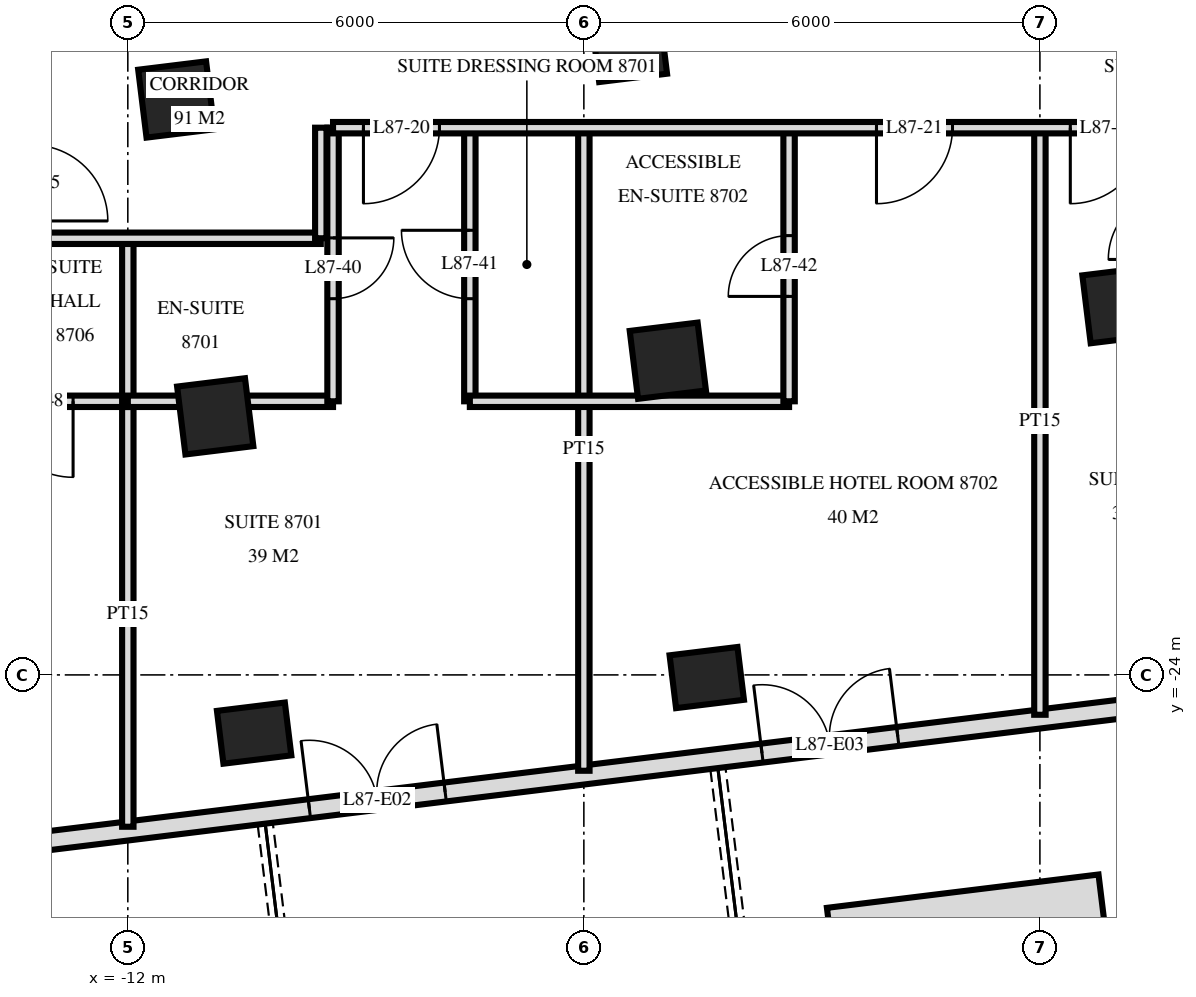
"""IFC4 building model, lengths in metres.
Left out: names, types, materials, properties, quantities, classifications, styles, units other than length and angle.
Written with IfcOpenShell. Run it as: python <this file> out.ifc"""

import sys

from ifc_helpers import new_model, si_unit, direction, frame, frame_2d, origin, origin_2d, place, context, subcontext, project, spatial, rectangle, extrude, element, fill, save


model = new_model("IFC4")
c1 = context("Model", 3, precision=1e-05, world=origin(), true_north=direction((0.0, 1.0)))
c2 = subcontext(c1, "Body", "Model", "MODEL_VIEW")
j1 = project(units=[si_unit("LENGTHUNIT", "METRE"), si_unit("PLANEANGLEUNIT", "RADIAN")], contexts=[c1])
p1 = place(None, origin())
s1 = spatial("IfcSite", under=j1, at=p1, CompositionType="ELEMENT")
p2 = place(p1, origin())
s2 = spatial("IfcBuilding", under=s1, at=p2, CompositionType="ELEMENT")
p3 = place(p2, frame((0.0, 0.0, 330.6)))
s3 = spatial("IfcBuildingStorey", under=s2, at=p3, CompositionType="ELEMENT", Elevation=330.6)
for number, where, z_axis, x_axis in (
    (1, (-11.362, -16.429, 0.0), (0.0, 0.0, 1.0), (0.993, 0.122, 0.0)),
    (2, (-10.85, -20.598, 0.0), (0.0, 0.0, 1.0), (0.993, 0.122, 0.0)),
):
    element("IfcColumn", number, at=place(p3, frame(where, z_axis=z_axis, x_axis=x_axis)), inside=s3, PredefinedType="COLUMN", context=c2, shape_type="SweptSolid", body=[
        extrude(rectangle(XDim=0.9, YDim=0.9, at=origin_2d()), origin(), (0.0, 0.0, 1.0), 4.0),
    ])
p4 = place(p3, frame((-10.338, -24.766, 0.0), z_axis=(0.0, 0.0, 1.0), x_axis=(0.992546151641, 0.121869343405, 0.0)))
e3 = element("IfcColumn", 3, at=p4, inside=s3, PredefinedType="COLUMN", context=c2, shape_type="SweptSolid", body=[
    extrude(rectangle(XDim=0.9, YDim=0.7, at=origin_2d()), origin(), (0.0, 0.0, 1.0), 4.0),
])
for number, where, z_axis, x_axis in (
    (4, (-5.407, -15.698, 0.0), (0.0, 0.0, 1.0), (0.993, 0.122, 0.0)),
    (5, (-4.895, -19.866, 0.0), (0.0, 0.0, 1.0), (0.993, 0.122, 0.0)),
):
    element("IfcColumn", number, at=place(p3, frame(where, z_axis=z_axis, x_axis=x_axis)), inside=s3, PredefinedType="COLUMN", context=c2, shape_type="SweptSolid", body=[
        extrude(rectangle(XDim=0.9, YDim=0.9, at=origin_2d()), origin(), (0.0, 0.0, 1.0), 4.0),
    ])
p5 = place(p3, frame((-4.383, -24.035, 0.0), z_axis=(0.0, 0.0, 1.0), x_axis=(0.992546151641, 0.121869343405, 0.0)))
e6 = element("IfcColumn", 6, at=p5, inside=s3, PredefinedType="COLUMN", context=c2, shape_type="SweptSolid", body=[
    extrude(rectangle(XDim=0.9, YDim=0.7, at=origin_2d()), origin(), (0.0, 0.0, 1.0), 4.0),
])
p6 = place(p3, frame((1.06, -19.135, 0.0), z_axis=(0.0, 0.0, 1.0), x_axis=(0.992546151641, 0.121869343405, 0.0)))
e7 = element("IfcColumn", 7, at=p6, inside=s3, PredefinedType="COLUMN", context=c2, shape_type="SweptSolid", body=[
    extrude(rectangle(XDim=0.9, YDim=0.9, at=origin_2d()), origin(), (0.0, 0.0, 1.0), 4.0),
])
p7 = place(p3, frame((-16.138, -26.561, 0.0), z_axis=(0.0, 0.0, 1.0), x_axis=(0.992546726876, 0.121864658405, 0.0)))
e8 = element("IfcWall", 8, at=p7, inside=s3, PredefinedType="SOLIDWALL", context=c2, shape_type="SweptSolid", body=[
    extrude(rectangle(XDim=35.951, YDim=0.25, at=frame_2d((17.975, 0.0))), origin(), (0.0, 0.0, 1.0), 3.72),
])
p8 = place(p7, frame((0.575, 0.0, 0.0)))
e9 = element("IfcOpeningElement", 9, at=p8, cuts=e8, PredefinedType="OPENING", context=c2, shape_type="SweptSolid", body=[
    extrude(rectangle(XDim=1.8, YDim=2.4, at=frame_2d((0.9, 1.2))), frame((0.0, 0.135, 0.0), z_axis=(0.0, -1.0, 0.0), x_axis=(1.0, 0.0, 0.0)), (0.0, 0.0, 1.0), 0.27),
])
p9 = place(p7, frame((6.576, 0.0, 0.0)))
e10 = element("IfcOpeningElement", 10, at=p9, cuts=e8, PredefinedType="OPENING", context=c2, shape_type="SweptSolid", body=[
    extrude(rectangle(XDim=1.8, YDim=2.4, at=frame_2d((0.9, 1.2))), frame((0.0, 0.135, 0.0), z_axis=(0.0, -1.0, 0.0), x_axis=(1.0, 0.0, 0.0)), (0.0, 0.0, 1.0), 0.27),
])
p10 = place(p7, frame((12.575, 0.0, 0.0)))
e11 = element("IfcOpeningElement", 11, at=p10, cuts=e8, PredefinedType="OPENING", context=c2, shape_type="SweptSolid", body=[
    extrude(rectangle(XDim=1.8, YDim=2.4, at=frame_2d((0.9, 1.2))), frame((0.0, 0.135, 0.0), z_axis=(0.0, -1.0, 0.0), x_axis=(1.0, 0.0, 0.0)), (0.0, 0.0, 1.0), 0.27),
])
p11 = place(p7, frame((18.575, 0.0, 0.0)))
e12 = element("IfcOpeningElement", 12, at=p11, cuts=e8, PredefinedType="OPENING", context=c2, shape_type="SweptSolid", body=[
    extrude(rectangle(XDim=1.8, YDim=2.4, at=frame_2d((0.9, 1.2))), frame((0.0, 0.135, 0.0), z_axis=(0.0, -1.0, 0.0), x_axis=(1.0, 0.0, 0.0)), (0.0, 0.0, 1.0), 0.27),
])
p12 = place(p7, frame((22.528, 0.0, 0.0)))
e13 = element("IfcOpeningElement", 13, at=p12, cuts=e8, PredefinedType="OPENING", context=c2, shape_type="SweptSolid", body=[
    extrude(rectangle(XDim=1.2, YDim=2.4, at=frame_2d((0.6, 1.2))), frame((0.0, 0.135, 0.0), z_axis=(0.0, -1.0, 0.0), x_axis=(1.0, 0.0, 0.0)), (0.0, 0.0, 1.0), 0.27),
])
p13 = place(p7, frame((25.923, 0.0, 0.0)))
e14 = element("IfcOpeningElement", 14, at=p13, cuts=e8, PredefinedType="OPENING", context=c2, shape_type="SweptSolid", body=[
    extrude(rectangle(XDim=1.8, YDim=2.4, at=frame_2d((0.9, 1.2))), frame((0.0, 0.135, 0.0), z_axis=(0.0, -1.0, 0.0), x_axis=(1.0, 0.0, 0.0)), (0.0, 0.0, 1.0), 0.27),
])
p14 = place(p7, frame((30.576, 0.0, 0.0)))
e15 = element("IfcOpeningElement", 15, at=p14, cuts=e8, PredefinedType="OPENING", context=c2, shape_type="SweptSolid", body=[
    extrude(rectangle(XDim=1.8, YDim=2.4, at=frame_2d((0.9, 1.2))), frame((0.0, 0.135, 0.0), z_axis=(0.0, -1.0, 0.0), x_axis=(1.0, 0.0, 0.0)), (0.0, 0.0, 1.0), 0.27),
])
p15 = place(p3, frame((0.808, -26.924, 0.0), z_axis=(0.0, 0.0, 1.0), x_axis=(-0.992545758265, -0.121872547154, 0.0)))
e16 = element("IfcWall", 16, at=p15, inside=s3, PredefinedType="USERDEFINED", context=c2, shape_type="SweptSolid", body=[
    extrude(rectangle(XDim=3.6, YDim=0.6, at=frame_2d((1.8, 0.0))), origin(), (0.0, 0.0, 1.0), 0.65),
])
p16 = place(p3, frame((0.0, -24.524, 0.0), z_axis=(0.0, 0.0, 1.0), x_axis=(0.0, 1.0, 0.0)))
e17 = element("IfcWall", 17, at=p16, inside=s3, PredefinedType="PARTITIONING", context=c2, shape_type="SweptSolid", body=[
    extrude(rectangle(XDim=7.724, YDim=0.15, at=frame_2d((3.862, 0.0))), origin(), (0.0, 0.0, 1.0), 3.72),
])
p17 = place(p3, frame((-3.3, -20.4, 0.0), z_axis=(0.0, 0.0, 1.0), x_axis=(0.0, 1.0, 0.0)))
e18 = element("IfcWall", 18, at=p17, inside=s3, PredefinedType="PARTITIONING", context=c2, shape_type="SweptSolid", body=[
    extrude(rectangle(XDim=3.6, YDim=0.15, at=frame_2d((1.8, 0.0))), origin(), (0.0, 0.0, 1.0), 3.72),
])
p18 = place(p17, frame((1.38, 0.0, 0.0)))
e19 = element("IfcOpeningElement", 19, at=p18, cuts=e18, PredefinedType="OPENING", context=c2, shape_type="SweptSolid", body=[
    extrude(rectangle(XDim=0.8, YDim=2.1, at=frame_2d((0.4, 1.05))), frame((0.0, 0.085, 0.0), z_axis=(0.0, -1.0, 0.0), x_axis=(1.0, 0.0, 0.0)), (0.0, 0.0, 1.0), 0.17),
])
p19 = place(p3, frame((-6.0, -25.261, 0.0), z_axis=(0.0, 0.0, 1.0), x_axis=(0.0, 1.0, 0.0)))
e20 = element("IfcWall", 20, at=p19, inside=s3, PredefinedType="PARTITIONING", context=c2, shape_type="SweptSolid", body=[
    extrude(rectangle(XDim=8.461, YDim=0.15, at=frame_2d((4.23, 0.0))), origin(), (0.0, 0.0, 1.0), 3.72),
])
p20 = place(p3, frame((-7.5, -20.4, 0.0), z_axis=(0.0, 0.0, 1.0), x_axis=(0.0, 1.0, 0.0)))
e21 = element("IfcWall", 21, at=p20, inside=s3, PredefinedType="PARTITIONING", context=c2, shape_type="SweptSolid", body=[
    extrude(rectangle(XDim=3.6, YDim=0.15, at=frame_2d((1.8, 0.0))), origin(), (0.0, 0.0, 1.0), 3.72),
])
p21 = place(p20, frame((1.35, 0.0, 0.0)))
e22 = element("IfcOpeningElement", 22, at=p21, cuts=e21, PredefinedType="OPENING", context=c2, shape_type="SweptSolid", body=[
    extrude(rectangle(XDim=0.9, YDim=2.1, at=frame_2d((0.45, 1.05))), frame((0.0, 0.085, 0.0), z_axis=(0.0, -1.0, 0.0), x_axis=(1.0, 0.0, 0.0)), (0.0, 0.0, 1.0), 0.17),
])
p22 = place(p3, frame((-9.3, -20.4, 0.0), z_axis=(0.0, 0.0, 1.0), x_axis=(0.0, 1.0, 0.0)))
e23 = element("IfcWall", 23, at=p22, inside=s3, PredefinedType="PARTITIONING", context=c2, shape_type="SweptSolid", body=[
    extrude(rectangle(XDim=3.6, YDim=0.15, at=frame_2d((1.8, 0.0))), origin(), (0.0, 0.0, 1.0), 3.72),
])
p23 = place(p22, frame((1.35, 0.0, 0.0)))
e24 = element("IfcOpeningElement", 24, at=p23, cuts=e23, PredefinedType="OPENING", context=c2, shape_type="SweptSolid", body=[
    extrude(rectangle(XDim=0.8, YDim=2.1, at=frame_2d((0.4, 1.05))), frame((0.0, 0.085, 0.0), z_axis=(0.0, -1.0, 0.0), x_axis=(1.0, 0.0, 0.0)), (0.0, 0.0, 1.0), 0.17),
])
p24 = place(p3, frame((-9.461, -18.255, 0.0), z_axis=(0.0, 0.0, 1.0), x_axis=(0.0, 1.0, 0.0)))
e25 = element("IfcWall", 25, at=p24, inside=s3, PredefinedType="PARTITIONING", context=c2, shape_type="SweptSolid", body=[
    extrude(rectangle(XDim=1.455, YDim=0.15, at=frame_2d((0.728, 0.0))), origin(), (0.0, 0.0, 1.0), 3.72),
])
p25 = place(p3, frame((-12.0, -20.4, 0.0), z_axis=(0.0, 0.0, 1.0), x_axis=(0.0, 1.0, 0.0)))
e26 = element("IfcWall", 26, at=p25, inside=s3, PredefinedType="PARTITIONING", context=c2, shape_type="SweptSolid", body=[
    extrude(rectangle(XDim=2.145, YDim=0.15, at=frame_2d((1.073, 0.0))), origin(), (0.0, 0.0, 1.0), 3.72),
])
p26 = place(p3, frame((-12.0, -25.998, 0.0), z_axis=(0.0, 0.0, 1.0), x_axis=(0.0, 1.0, 0.0)))
e27 = element("IfcWall", 27, at=p26, inside=s3, PredefinedType="PARTITIONING", context=c2, shape_type="SweptSolid", body=[
    extrude(rectangle(XDim=5.598, YDim=0.15, at=frame_2d((2.799, 0.0))), origin(), (0.0, 0.0, 1.0), 3.72),
])
p27 = place(p3, frame((-14.4, -20.4, 0.0), z_axis=(0.0, 0.0, 1.0), x_axis=(1.0, 0.0, 0.0)))
e28 = element("IfcWall", 28, at=p27, inside=s3, PredefinedType="PARTITIONING", context=c2, shape_type="SweptSolid", body=[
    extrude(rectangle(XDim=2.4, YDim=0.15, at=frame_2d((1.2, 0.0))), origin(), (0.0, 0.0, 1.0), 3.72),
])
p28 = place(p27, frame((0.68, 0.0, 0.0)))
e29 = element("IfcOpeningElement", 29, at=p28, cuts=e28, PredefinedType="OPENING", context=c2, shape_type="SweptSolid", body=[
    extrude(rectangle(XDim=1.0, YDim=2.1, at=frame_2d((0.5, 1.05))), frame((0.0, 0.085, 0.0), z_axis=(0.0, -1.0, 0.0), x_axis=(1.0, 0.0, 0.0)), (0.0, 0.0, 1.0), 0.17),
])
p29 = place(p3, frame((-12.0, -20.4, 0.0), z_axis=(0.0, 0.0, 1.0), x_axis=(1.0, 0.0, 0.0)))
e30 = element("IfcWall", 30, at=p29, inside=s3, PredefinedType="PARTITIONING", context=c2, shape_type="SweptSolid", body=[
    extrude(rectangle(XDim=2.7, YDim=0.15, at=frame_2d((1.35, 0.0))), origin(), (0.0, 0.0, 1.0), 3.72),
])
p30 = place(p3, frame((-7.5, -20.4, 0.0), z_axis=(0.0, 0.0, 1.0), x_axis=(1.0, 0.0, 0.0)))
e31 = element("IfcWall", 31, at=p30, inside=s3, PredefinedType="PARTITIONING", context=c2, shape_type="SweptSolid", body=[
    extrude(rectangle(XDim=4.2, YDim=0.15, at=frame_2d((2.1, 0.0))), origin(), (0.0, 0.0, 1.0), 3.72),
])
p31 = place(p3, frame((-13.263, -18.255, 0.0), z_axis=(0.0, 0.0, 1.0), x_axis=(1.0, 0.0, 0.0)))
e32 = element("IfcWall", 32, at=p31, inside=s3, PredefinedType="PARTITIONING", context=c2, shape_type="SweptSolid", body=[
    extrude(rectangle(XDim=3.802, YDim=0.15, at=frame_2d((1.901, 0.0))), origin(), (0.0, 0.0, 1.0), 3.72),
])
p32 = place(p3, frame((-9.3, -16.8, 0.0), z_axis=(0.0, 0.0, 1.0), x_axis=(1.0, 0.0, 0.0)))
e33 = element("IfcWall", 33, at=p32, inside=s3, PredefinedType="PARTITIONING", context=c2, shape_type="SweptSolid", body=[
    extrude(rectangle(XDim=32.561, YDim=0.15, at=frame_2d((16.281, 0.0))), origin(), (0.0, 0.0, 1.0), 3.72),
])
p33 = place(p32, frame((0.4, 0.0, 0.0)))
e34 = element("IfcOpeningElement", 34, at=p33, cuts=e33, PredefinedType="OPENING", context=c2, shape_type="SweptSolid", body=[
    extrude(rectangle(XDim=1.0, YDim=2.1, at=frame_2d((0.5, 1.05))), frame((0.0, 0.085, 0.0), z_axis=(0.0, -1.0, 0.0), x_axis=(1.0, 0.0, 0.0)), (0.0, 0.0, 1.0), 0.17),
])
p34 = place(p32, frame((7.15, 0.0, 0.0)))
e35 = element("IfcOpeningElement", 35, at=p34, cuts=e33, PredefinedType="OPENING", context=c2, shape_type="SweptSolid", body=[
    extrude(rectangle(XDim=1.0, YDim=2.1, at=frame_2d((0.5, 1.05))), frame((0.0, 0.085, 0.0), z_axis=(0.0, -1.0, 0.0), x_axis=(1.0, 0.0, 0.0)), (0.0, 0.0, 1.0), 0.17),
])
p35 = place(p32, frame((9.7, 0.0, 0.0)))
e36 = element("IfcOpeningElement", 36, at=p35, cuts=e33, PredefinedType="OPENING", context=c2, shape_type="SweptSolid", body=[
    extrude(rectangle(XDim=1.0, YDim=2.1, at=frame_2d((0.5, 1.05))), frame((0.0, 0.085, 0.0), z_axis=(0.0, -1.0, 0.0), x_axis=(1.0, 0.0, 0.0)), (0.0, 0.0, 1.0), 0.17),
])
p36 = place(p32, frame((17.149, 0.0, 0.0)))
e37 = element("IfcOpeningElement", 37, at=p36, cuts=e33, PredefinedType="OPENING", context=c2, shape_type="SweptSolid", body=[
    extrude(rectangle(XDim=1.0, YDim=2.1, at=frame_2d((0.5, 1.05))), frame((0.0, 0.085, 0.0), z_axis=(0.0, -1.0, 0.0), x_axis=(1.0, 0.0, 0.0)), (0.0, 0.0, 1.0), 0.17),
])
p37 = place(p32, frame((18.45, 0.0, 0.0)))
e38 = element("IfcOpeningElement", 38, at=p37, cuts=e33, PredefinedType="OPENING", context=c2, shape_type="SweptSolid", body=[
    extrude(rectangle(XDim=1.0, YDim=2.1, at=frame_2d((0.5, 1.05))), frame((0.0, 0.085, 0.0), z_axis=(0.0, -1.0, 0.0), x_axis=(1.0, 0.0, 0.0)), (0.0, 0.0, 1.0), 0.17),
])
p38 = place(p32, frame((24.98, 0.0, 0.0)))
e39 = element("IfcOpeningElement", 39, at=p38, cuts=e33, PredefinedType="OPENING", context=c2, shape_type="SweptSolid", body=[
    extrude(rectangle(XDim=1.0, YDim=2.1, at=frame_2d((0.5, 1.05))), frame((0.0, 0.085, 0.0), z_axis=(0.0, -1.0, 0.0), x_axis=(1.0, 0.0, 0.0)), (0.0, 0.0, 1.0), 0.17),
])
p39 = place(p9, origin())
e40 = element("IfcDoor", 40, at=p39, inside=s3, OperationType="DOUBLE_DOOR_SINGLE_SWING", PredefinedType="DOOR", context=c2, shape_type="SweptSolid", body=[
    extrude(rectangle(XDim=1.8, YDim=2.4, at=frame_2d((0.9, 1.2))), frame((0.0, 0.025, 0.0), z_axis=(0.0, -1.0, 0.0), x_axis=(1.0, 0.0, 0.0)), (0.0, 0.0, 1.0), 0.05),
])
fill(e10, e40)
p40 = place(p10, origin())
e41 = element("IfcDoor", 41, at=p40, inside=s3, OperationType="DOUBLE_DOOR_SINGLE_SWING", PredefinedType="DOOR", context=c2, shape_type="SweptSolid", body=[
    extrude(rectangle(XDim=1.8, YDim=2.4, at=frame_2d((0.9, 1.2))), frame((0.0, 0.025, 0.0), z_axis=(0.0, -1.0, 0.0), x_axis=(1.0, 0.0, 0.0)), (0.0, 0.0, 1.0), 0.05),
])
fill(e11, e41)
p41 = place(p33, frame((0.5, 0.0, 0.0), z_axis=(0.0, 0.0, 1.0), x_axis=(-1.0, 0.0, 0.0)))
e42 = element("IfcDoor", 42, at=p41, inside=s3, OperationType="SINGLE_SWING_LEFT", PredefinedType="DOOR", context=c2, shape_type="SweptSolid", body=[
    extrude(rectangle(XDim=1.0, YDim=2.1, at=frame_2d((0.0, 1.05))), frame((0.0, -0.025, 0.0), z_axis=(0.0, 1.0, 0.0), x_axis=(-1.0, 0.0, 0.0)), (0.0, 0.0, 1.0), 0.05),
])
fill(e34, e42)
p42 = place(p34, frame((0.5, 0.0, 0.0), z_axis=(0.0, 0.0, 1.0), x_axis=(-1.0, 0.0, 0.0)))
e43 = element("IfcDoor", 43, at=p42, inside=s3, OperationType="SINGLE_SWING_LEFT", PredefinedType="DOOR", context=c2, shape_type="SweptSolid", body=[
    extrude(rectangle(XDim=1.0, YDim=2.1, at=frame_2d((0.0, 1.05))), frame((0.0, -0.025, 0.0), z_axis=(0.0, 1.0, 0.0), x_axis=(-1.0, 0.0, 0.0)), (0.0, 0.0, 1.0), 0.05),
])
fill(e35, e43)
p43 = place(p35, frame((0.5, 0.0, 0.0), z_axis=(0.0, 0.0, 1.0), x_axis=(-1.0, 0.0, 0.0)))
e44 = element("IfcDoor", 44, at=p43, inside=s3, OperationType="SINGLE_SWING_LEFT", PredefinedType="DOOR", context=c2, shape_type="SweptSolid", body=[
    extrude(rectangle(XDim=1.0, YDim=2.1, at=frame_2d((0.0, 1.05))), frame((0.0, -0.025, 0.0), z_axis=(0.0, 1.0, 0.0), x_axis=(-1.0, 0.0, 0.0)), (0.0, 0.0, 1.0), 0.05),
])
fill(e36, e44)
p44 = place(p23, frame((0.4, 0.0, 0.0), z_axis=(0.0, 0.0, 1.0), x_axis=(-1.0, 0.0, 0.0)))
e45 = element("IfcDoor", 45, at=p44, inside=s3, OperationType="SINGLE_SWING_RIGHT", PredefinedType="DOOR", context=c2, shape_type="SweptSolid", body=[
    extrude(rectangle(XDim=0.8, YDim=2.1, at=frame_2d((0.0, 1.05))), frame((0.0, -0.025, 0.0), z_axis=(0.0, 1.0, 0.0), x_axis=(-1.0, 0.0, 0.0)), (0.0, 0.0, 1.0), 0.05),
])
fill(e24, e45)
p45 = place(p21, origin())
e46 = element("IfcDoor", 46, at=p45, inside=s3, OperationType="SINGLE_SWING_LEFT", PredefinedType="DOOR", context=c2, shape_type="SweptSolid", body=[
    extrude(rectangle(XDim=0.9, YDim=2.1, at=frame_2d((0.45, 1.05))), frame((0.0, 0.025, 0.0), z_axis=(0.0, -1.0, 0.0), x_axis=(1.0, 0.0, 0.0)), (0.0, 0.0, 1.0), 0.05),
])
fill(e22, e46)
p46 = place(p18, origin())
e47 = element("IfcDoor", 47, at=p46, inside=s3, OperationType="SINGLE_SWING_RIGHT", PredefinedType="DOOR", context=c2, shape_type="SweptSolid", body=[
    extrude(rectangle(XDim=0.8, YDim=2.1, at=frame_2d((0.4, 1.05))), frame((0.0, 0.025, 0.0), z_axis=(0.0, -1.0, 0.0), x_axis=(1.0, 0.0, 0.0)), (0.0, 0.0, 1.0), 0.05),
])
fill(e19, e47)
p47 = place(p28, frame((0.5, 0.0, 0.0), z_axis=(0.0, 0.0, 1.0), x_axis=(-1.0, 0.0, 0.0)))
e48 = element("IfcDoor", 48, at=p47, inside=s3, OperationType="SINGLE_SWING_RIGHT", PredefinedType="DOOR", context=c2, shape_type="SweptSolid", body=[
    extrude(rectangle(XDim=1.0, YDim=2.1, at=frame_2d((0.0, 1.05))), frame((0.0, -0.025, 0.0), z_axis=(0.0, 1.0, 0.0), x_axis=(-1.0, 0.0, 0.0)), (0.0, 0.0, 1.0), 0.05),
])
fill(e29, e48)
save(model, sys.argv[1])
